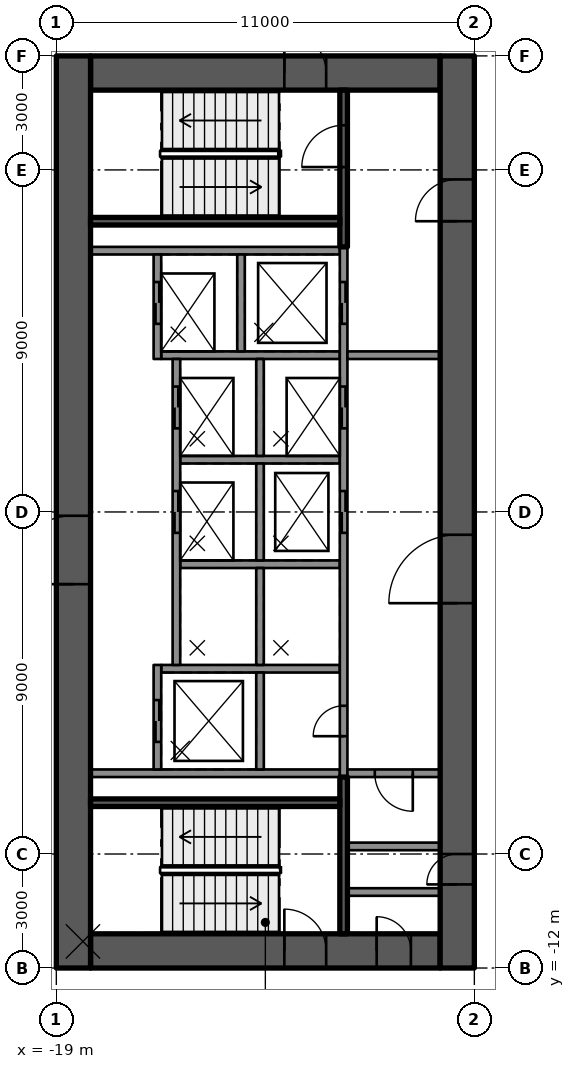
"""IFC4 building model, lengths in metres.
Left out: names, types, materials, properties, quantities, classifications, styles, units other than length and angle.
Written with IfcOpenShell. Run it as: python <this file> out.ifc"""

import sys

from ifc_helpers import new_model, si_unit, direction, frame, frame_2d, origin, place, context, subcontext, project, spatial, rectangle, extrude, element, fill, save


model = new_model("IFC4")
c1 = context("Model", 3, precision=1e-05, world=origin(), true_north=direction((0.0, 1.0)))
c2 = subcontext(c1, "Body", "Model", "MODEL_VIEW")
j1 = project(units=[si_unit("LENGTHUNIT", "METRE"), si_unit("PLANEANGLEUNIT", "RADIAN")], contexts=[c1])
p1 = place(None, origin())
s1 = spatial("IfcSite", under=j1, at=p1, CompositionType="ELEMENT")
p2 = place(p1, origin())
s2 = spatial("IfcBuilding", under=s1, at=p2, CompositionType="ELEMENT")
p3 = place(p2, frame((0.0, 0.0, 33.3)))
s3 = spatial("IfcBuildingStorey", under=s2, at=p3, CompositionType="ELEMENT", Elevation=33.3)
p4 = place(p3, frame((-18.1, 11.55, 0.0), z_axis=(0.0, 0.0, 1.0), x_axis=(1.0, 0.0, 0.0)))
e1 = element("IfcWall", 1, at=p4, inside=s3, PredefinedType="SHEAR", context=c2, shape_type="SweptSolid", body=[
    extrude(rectangle(XDim=9.2, YDim=0.9, at=frame_2d((4.6, 0.0))), origin(), (0.0, 0.0, 1.0), 4.0),
])
p5 = place(p4, frame((5.1, 0.0, 0.0)))
e2 = element("IfcOpeningElement", 2, at=p5, cuts=e1, PredefinedType="OPENING", context=c2, shape_type="SweptSolid", body=[
    extrude(rectangle(XDim=1.1, YDim=2.1, at=frame_2d((0.55, 1.05))), frame((0.0, 0.46, 0.0), z_axis=(0.0, -1.0, 0.0), x_axis=(1.0, 0.0, 0.0)), (0.0, 0.0, 1.0), 0.92),
])
p6 = place(p3, frame((-18.1, -11.55, 0.0), z_axis=(0.0, 0.0, 1.0), x_axis=(1.0, 0.0, 0.0)))
e3 = element("IfcWall", 3, at=p6, inside=s3, PredefinedType="SHEAR", context=c2, shape_type="SweptSolid", body=[
    extrude(rectangle(XDim=9.2, YDim=0.9, at=frame_2d((4.6, 0.0))), origin(), (0.0, 0.0, 1.0), 4.0),
])
p7 = place(p6, frame((5.1, 0.0, 0.0)))
e4 = element("IfcOpeningElement", 4, at=p7, cuts=e3, PredefinedType="OPENING", context=c2, shape_type="SweptSolid", body=[
    extrude(rectangle(XDim=1.1, YDim=2.1, at=frame_2d((0.55, 1.05))), frame((0.0, 0.46, 0.0), z_axis=(0.0, -1.0, 0.0), x_axis=(1.0, 0.0, 0.0)), (0.0, 0.0, 1.0), 0.92),
])
p8 = place(p6, frame((7.53, 0.0, 0.0)))
e5 = element("IfcOpeningElement", 5, at=p8, cuts=e3, PredefinedType="OPENING", context=c2, shape_type="SweptSolid", body=[
    extrude(rectangle(XDim=0.9, YDim=2.1, at=frame_2d((0.45, 1.05))), frame((0.0, 0.46, 0.0), z_axis=(0.0, -1.0, 0.0), x_axis=(1.0, 0.0, 0.0)), (0.0, 0.0, 1.0), 0.92),
])
p9 = place(p3, frame((-18.55, -12.0, 0.0), z_axis=(0.0, 0.0, 1.0), x_axis=(0.0, 1.0, 0.0)))
e6 = element("IfcWall", 6, at=p9, inside=s3, PredefinedType="SHEAR", context=c2, shape_type="SweptSolid", body=[
    extrude(rectangle(XDim=24.0, YDim=0.9, at=frame_2d((12.0, 0.0))), origin(), (0.0, 0.0, 1.0), 4.0),
])
p10 = place(p9, frame((10.1, 0.0, 0.0)))
e7 = element("IfcOpeningElement", 7, at=p10, cuts=e6, PredefinedType="OPENING", context=c2, shape_type="SweptSolid", body=[
    extrude(rectangle(XDim=1.8, YDim=2.1, at=frame_2d((0.9, 1.05))), frame((0.0, 0.46, 0.0), z_axis=(0.0, -1.0, 0.0), x_axis=(1.0, 0.0, 0.0)), (0.0, 0.0, 1.0), 0.92),
])
p11 = place(p3, frame((-8.45, -12.0, 0.0), z_axis=(0.0, 0.0, 1.0), x_axis=(0.0, 1.0, 0.0)))
e8 = element("IfcWall", 8, at=p11, inside=s3, PredefinedType="SHEAR", context=c2, shape_type="SweptSolid", body=[
    extrude(rectangle(XDim=24.0, YDim=0.9, at=frame_2d((12.0, 0.0))), origin(), (0.0, 0.0, 1.0), 4.0),
])
p12 = place(p11, frame((9.6, 0.0, 0.0)))
e9 = element("IfcOpeningElement", 9, at=p12, cuts=e8, PredefinedType="OPENING", context=c2, shape_type="SweptSolid", body=[
    extrude(rectangle(XDim=1.8, YDim=2.1, at=frame_2d((0.9, 1.05))), frame((0.0, 0.46, 0.0), z_axis=(0.0, -1.0, 0.0), x_axis=(1.0, 0.0, 0.0)), (0.0, 0.0, 1.0), 0.92),
])
p13 = place(p11, frame((19.65, 0.0, 0.0)))
e10 = element("IfcOpeningElement", 10, at=p13, cuts=e8, PredefinedType="OPENING", context=c2, shape_type="SweptSolid", body=[
    extrude(rectangle(XDim=1.1, YDim=2.1, at=frame_2d((0.55, 1.05))), frame((0.0, 0.46, 0.0), z_axis=(0.0, -1.0, 0.0), x_axis=(1.0, 0.0, 0.0)), (0.0, 0.0, 1.0), 0.92),
])
p14 = place(p11, frame((2.2, 0.0, 0.0)))
e11 = element("IfcOpeningElement", 11, at=p14, cuts=e8, PredefinedType="OPENING", context=c2, shape_type="SweptSolid", body=[
    extrude(rectangle(XDim=0.8, YDim=2.1, at=frame_2d((0.4, 1.05))), frame((0.0, 0.46, 0.0), z_axis=(0.0, -1.0, 0.0), x_axis=(1.0, 0.0, 0.0)), (0.0, 0.0, 1.0), 0.92),
])
for number, where, z_axis, x_axis in (
    (12, (-11.54, 6.875, 0.0), (0.0, 0.0, 1.0), (-1.0, 0.0, 0.0)),
    (13, (-11.54, -6.875, 0.0), (0.0, 0.0, 1.0), (-1.0, 0.0, 0.0)),
):
    element("IfcWall", number, at=place(p3, frame(where, z_axis=z_axis, x_axis=x_axis)), inside=s3, PredefinedType="SOLIDWALL", context=c2, shape_type="SweptSolid", body=[
        extrude(rectangle(XDim=6.56, YDim=0.2, at=frame_2d((3.28, 0.0))), origin(), (0.0, 0.0, 1.0), 3.58),
    ])
p15 = place(p3, frame((-11.54, -4.125, 0.0), z_axis=(0.0, 0.0, 1.0), x_axis=(-1.0, 0.0, 0.0)))
e14 = element("IfcWall", 14, at=p15, inside=s3, PredefinedType="SOLIDWALL", context=c2, shape_type="SweptSolid", body=[
    extrude(rectangle(XDim=4.7, YDim=0.2, at=frame_2d((2.35, 0.0))), origin(), (0.0, 0.0, 1.0), 3.58),
])
for number, where, z_axis, x_axis in (
    (15, (-11.54, -1.375, 0.0), (0.0, 0.0, 1.0), (-1.0, 0.0, 0.0)),
    (16, (-11.54, 1.375, 0.0), (0.0, 0.0, 1.0), (-1.0, 0.0, 0.0)),
):
    element("IfcWall", number, at=place(p3, frame(where, z_axis=z_axis, x_axis=x_axis)), inside=s3, PredefinedType="SOLIDWALL", context=c2, shape_type="SweptSolid", body=[
        extrude(rectangle(XDim=4.2, YDim=0.2, at=frame_2d((2.1, 0.0))), origin(), (0.0, 0.0, 1.0), 3.58),
    ])
p16 = place(p3, frame((-11.54, 4.125, 0.0), z_axis=(0.0, 0.0, 1.0), x_axis=(-1.0, 0.0, 0.0)))
e17 = element("IfcWall", 17, at=p16, inside=s3, PredefinedType="SOLIDWALL", context=c2, shape_type="SweptSolid", body=[
    extrude(rectangle(XDim=4.7, YDim=0.2, at=frame_2d((2.35, 0.0))), origin(), (0.0, 0.0, 1.0), 3.58),
])
p17 = place(p3, frame((-11.44, -6.975, 0.0), z_axis=(0.0, 0.0, 1.0), x_axis=(0.0, 1.0, 0.0)))
e18 = element("IfcWall", 18, at=p17, inside=s3, PredefinedType="SOLIDWALL", context=c2, shape_type="SweptSolid", body=[
    extrude(rectangle(XDim=13.95, YDim=0.2, at=frame_2d((6.975, 0.0))), origin(), (0.0, 0.0, 1.0), 3.58),
])
p18 = place(p17, frame((6.425, 0.0, 0.0)))
e19 = element("IfcOpeningElement", 19, at=p18, cuts=e18, PredefinedType="OPENING", context=c2, shape_type="SweptSolid", body=[
    extrude(rectangle(XDim=1.1, YDim=2.1, at=frame_2d((0.55, 1.05))), frame((0.0, 0.11, 0.0), z_axis=(0.0, -1.0, 0.0), x_axis=(1.0, 0.0, 0.0)), (0.0, 0.0, 1.0), 0.22),
])
p19 = place(p17, frame((9.175, 0.0, 0.0)))
e20 = element("IfcOpeningElement", 20, at=p19, cuts=e18, PredefinedType="OPENING", context=c2, shape_type="SweptSolid", body=[
    extrude(rectangle(XDim=1.1, YDim=2.1, at=frame_2d((0.55, 1.05))), frame((0.0, 0.11, 0.0), z_axis=(0.0, -1.0, 0.0), x_axis=(1.0, 0.0, 0.0)), (0.0, 0.0, 1.0), 0.22),
])
p20 = place(p17, frame((11.925, 0.0, 0.0)))
e21 = element("IfcOpeningElement", 21, at=p20, cuts=e18, PredefinedType="OPENING", context=c2, shape_type="SweptSolid", body=[
    extrude(rectangle(XDim=1.1, YDim=2.1, at=frame_2d((0.55, 1.05))), frame((0.0, 0.11, 0.0), z_axis=(0.0, -1.0, 0.0), x_axis=(1.0, 0.0, 0.0)), (0.0, 0.0, 1.0), 0.22),
])
p21 = place(p17, frame((1.075, 0.0, 0.0)))
e22 = element("IfcOpeningElement", 22, at=p21, cuts=e18, PredefinedType="OPENING", context=c2, shape_type="SweptSolid", body=[
    extrude(rectangle(XDim=0.8, YDim=2.1, at=frame_2d((0.4, 1.05))), frame((0.0, 0.11, 0.0), z_axis=(0.0, -1.0, 0.0), x_axis=(1.0, 0.0, 0.0)), (0.0, 0.0, 1.0), 0.22),
])
for number, where, z_axis, x_axis in (
    (23, (-13.64, -6.775, 0.0), (0.0, 0.0, 1.0), (0.0, 1.0, 0.0)),
    (24, (-13.64, -4.025, 0.0), (0.0, 0.0, 1.0), (0.0, 1.0, 0.0)),
    (25, (-13.64, -1.275, 0.0), (0.0, 0.0, 1.0), (0.0, 1.0, 0.0)),
    (26, (-13.64, 1.475, 0.0), (0.0, 0.0, 1.0), (0.0, 1.0, 0.0)),
    (27, (-14.14, 4.225, 0.0), (0.0, 0.0, 1.0), (0.0, 1.0, 0.0)),
):
    element("IfcWall", number, at=place(p3, frame(where, z_axis=z_axis, x_axis=x_axis)), inside=s3, PredefinedType="SOLIDWALL", context=c2, shape_type="SweptSolid", body=[
        extrude(rectangle(XDim=2.55, YDim=0.2, at=frame_2d((1.275, 0.0))), origin(), (0.0, 0.0, 1.0), 3.58),
    ])
p22 = place(p3, frame((-16.34, -6.775, 0.0), z_axis=(0.0, 0.0, 1.0), x_axis=(0.0, 1.0, 0.0)))
e28 = element("IfcWall", 28, at=p22, inside=s3, PredefinedType="SOLIDWALL", context=c2, shape_type="SweptSolid", body=[
    extrude(rectangle(XDim=2.75, YDim=0.2, at=frame_2d((1.375, 0.0))), origin(), (0.0, 0.0, 1.0), 3.58),
])
p23 = place(p22, frame((0.725, 0.0, 0.0)))
e29 = element("IfcOpeningElement", 29, at=p23, cuts=e28, PredefinedType="OPENING", context=c2, shape_type="SweptSolid", body=[
    extrude(rectangle(XDim=1.1, YDim=2.1, at=frame_2d((0.55, 1.05))), frame((0.0, 0.11, 0.0), z_axis=(0.0, -1.0, 0.0), x_axis=(1.0, 0.0, 0.0)), (0.0, 0.0, 1.0), 0.22),
])
p24 = place(p3, frame((-15.84, -4.025, 0.0), z_axis=(0.0, 0.0, 1.0), x_axis=(0.0, 1.0, 0.0)))
e30 = element("IfcWall", 30, at=p24, inside=s3, PredefinedType="SOLIDWALL", context=c2, shape_type="SweptSolid", body=[
    extrude(rectangle(XDim=8.05, YDim=0.2, at=frame_2d((4.025, 0.0))), origin(), (0.0, 0.0, 1.0), 3.58),
])
p25 = place(p24, frame((3.475, 0.0, 0.0)))
e31 = element("IfcOpeningElement", 31, at=p25, cuts=e30, PredefinedType="OPENING", context=c2, shape_type="SweptSolid", body=[
    extrude(rectangle(XDim=1.1, YDim=2.1, at=frame_2d((0.55, 1.05))), frame((0.0, 0.11, 0.0), z_axis=(0.0, -1.0, 0.0), x_axis=(1.0, 0.0, 0.0)), (0.0, 0.0, 1.0), 0.22),
])
p26 = place(p24, frame((6.225, 0.0, 0.0)))
e32 = element("IfcOpeningElement", 32, at=p26, cuts=e30, PredefinedType="OPENING", context=c2, shape_type="SweptSolid", body=[
    extrude(rectangle(XDim=1.1, YDim=2.1, at=frame_2d((0.55, 1.05))), frame((0.0, 0.11, 0.0), z_axis=(0.0, -1.0, 0.0), x_axis=(1.0, 0.0, 0.0)), (0.0, 0.0, 1.0), 0.22),
])
p27 = place(p3, frame((-16.34, 4.025, 0.0), z_axis=(0.0, 0.0, 1.0), x_axis=(0.0, 1.0, 0.0)))
e33 = element("IfcWall", 33, at=p27, inside=s3, PredefinedType="SOLIDWALL", context=c2, shape_type="SweptSolid", body=[
    extrude(rectangle(XDim=2.75, YDim=0.2, at=frame_2d((1.375, 0.0))), origin(), (0.0, 0.0, 1.0), 3.58),
])
p28 = place(p27, frame((0.925, 0.0, 0.0)))
e34 = element("IfcOpeningElement", 34, at=p28, cuts=e33, PredefinedType="OPENING", context=c2, shape_type="SweptSolid", body=[
    extrude(rectangle(XDim=1.1, YDim=2.1, at=frame_2d((0.55, 1.05))), frame((0.0, 0.11, 0.0), z_axis=(0.0, -1.0, 0.0), x_axis=(1.0, 0.0, 0.0)), (0.0, 0.0, 1.0), 0.22),
])
p29 = place(p3, frame((-11.44, 6.975, 0.0), z_axis=(0.0, 0.0, 1.0), x_axis=(0.0, 1.0, 0.0)))
e35 = element("IfcWall", 35, at=p29, inside=s3, PredefinedType="SOLIDWALL", context=c2, shape_type="SweptSolid", body=[
    extrude(rectangle(XDim=4.125, YDim=0.2, at=frame_2d((2.062, 0.0))), origin(), (0.0, 0.0, 1.0), 3.58),
])
p30 = place(p29, frame((2.1, 0.0, 0.0)))
e36 = element("IfcOpeningElement", 36, at=p30, cuts=e35, PredefinedType="OPENING", context=c2, shape_type="SweptSolid", body=[
    extrude(rectangle(XDim=1.1, YDim=2.1, at=frame_2d((0.55, 1.05))), frame((0.0, 0.11, 0.0), z_axis=(0.0, -1.0, 0.0), x_axis=(1.0, 0.0, 0.0)), (0.0, 0.0, 1.0), 0.22),
])
p31 = place(p3, frame((-11.54, 7.65, 0.0), z_axis=(0.0, 0.0, 1.0), x_axis=(-1.0, 0.0, 0.0)))
e37 = element("IfcWall", 37, at=p31, inside=s3, PredefinedType="SOLIDWALL", context=c2, shape_type="SweptSolid", body=[
    extrude(rectangle(XDim=6.56, YDim=0.2, at=frame_2d((3.28, 0.0))), origin(), (0.0, 0.0, 1.0), 3.58),
])
p32 = place(p3, frame((-11.44, -11.1, 0.0), z_axis=(0.0, 0.0, 1.0), x_axis=(0.0, 1.0, 0.0)))
e38 = element("IfcWall", 38, at=p32, inside=s3, PredefinedType="SOLIDWALL", context=c2, shape_type="SweptSolid", body=[
    extrude(rectangle(XDim=4.125, YDim=0.2, at=frame_2d((2.062, 0.0))), origin(), (0.0, 0.0, 1.0), 3.58),
])
p33 = place(p3, frame((-11.54, -7.65, 0.0), z_axis=(0.0, 0.0, 1.0), x_axis=(-1.0, 0.0, 0.0)))
e39 = element("IfcWall", 39, at=p33, inside=s3, PredefinedType="SOLIDWALL", context=c2, shape_type="SweptSolid", body=[
    extrude(rectangle(XDim=6.56, YDim=0.2, at=frame_2d((3.28, 0.0))), origin(), (0.0, 0.0, 1.0), 3.58),
])
p34 = place(p3, frame((-8.9, 4.125, 0.0), z_axis=(0.0, 0.0, 1.0), x_axis=(-1.0, 0.0, 0.0)))
e40 = element("IfcWall", 40, at=p34, inside=s3, PredefinedType="PARTITIONING", context=c2, shape_type="SweptSolid", body=[
    extrude(rectangle(XDim=2.44, YDim=0.2, at=frame_2d((1.22, 0.0))), origin(), (0.0, 0.0, 1.0), 3.58),
])
p35 = place(p3, frame((-8.9, -6.875, 0.0), z_axis=(0.0, 0.0, 1.0), x_axis=(-1.0, 0.0, 0.0)))
e41 = element("IfcWall", 41, at=p35, inside=s3, PredefinedType="PARTITIONING", context=c2, shape_type="SweptSolid", body=[
    extrude(rectangle(XDim=2.44, YDim=0.2, at=frame_2d((1.22, 0.0))), origin(), (0.0, 0.0, 1.0), 3.58),
])
p36 = place(p35, frame((0.72, 0.0, 0.0)))
e42 = element("IfcOpeningElement", 42, at=p36, cuts=e41, PredefinedType="OPENING", context=c2, shape_type="SweptSolid", body=[
    extrude(rectangle(XDim=1.0, YDim=2.1, at=frame_2d((0.5, 1.05))), frame((0.0, 0.11, 0.0), z_axis=(0.0, -1.0, 0.0), x_axis=(1.0, 0.0, 0.0)), (0.0, 0.0, 1.0), 0.22),
])
for number, where, z_axis, x_axis in (
    (43, (-8.9, -10.0, 0.0), (0.0, 0.0, 1.0), (-1.0, 0.0, 0.0)),
    (44, (-8.9, -8.8, 0.0), (0.0, 0.0, 1.0), (-1.0, 0.0, 0.0)),
):
    element("IfcWall", number, at=place(p3, frame(where, z_axis=z_axis, x_axis=x_axis)), inside=s3, PredefinedType="PARTITIONING", context=c2, shape_type="SweptSolid", body=[
        extrude(rectangle(XDim=2.44, YDim=0.2, at=frame_2d((1.22, 0.0))), origin(), (0.0, 0.0, 1.0), 3.58),
    ])
p37 = place(p23, origin())
e45 = element("IfcDoor", 45, at=p37, inside=s3, OperationType="DOUBLE_DOOR_SLIDING", PredefinedType="DOOR", context=c2, shape_type="SweptSolid", body=[
    extrude(rectangle(XDim=1.1, YDim=2.1, at=frame_2d((0.55, 1.05))), frame((0.0, 0.025, 0.0), z_axis=(0.0, -1.0, 0.0), x_axis=(1.0, 0.0, 0.0)), (0.0, 0.0, 1.0), 0.05),
])
fill(e29, e45)
p38 = place(p18, origin())
e46 = element("IfcDoor", 46, at=p38, inside=s3, OperationType="DOUBLE_DOOR_SLIDING", PredefinedType="DOOR", context=c2, shape_type="SweptSolid", body=[
    extrude(rectangle(XDim=1.1, YDim=2.1, at=frame_2d((0.55, 1.05))), frame((0.0, 0.025, 0.0), z_axis=(0.0, -1.0, 0.0), x_axis=(1.0, 0.0, 0.0)), (0.0, 0.0, 1.0), 0.05),
])
fill(e19, e46)
p39 = place(p25, origin())
e47 = element("IfcDoor", 47, at=p39, inside=s3, OperationType="DOUBLE_DOOR_SLIDING", PredefinedType="DOOR", context=c2, shape_type="SweptSolid", body=[
    extrude(rectangle(XDim=1.1, YDim=2.1, at=frame_2d((0.55, 1.05))), frame((0.0, 0.025, 0.0), z_axis=(0.0, -1.0, 0.0), x_axis=(1.0, 0.0, 0.0)), (0.0, 0.0, 1.0), 0.05),
])
fill(e31, e47)
p40 = place(p19, origin())
e48 = element("IfcDoor", 48, at=p40, inside=s3, OperationType="DOUBLE_DOOR_SLIDING", PredefinedType="DOOR", context=c2, shape_type="SweptSolid", body=[
    extrude(rectangle(XDim=1.1, YDim=2.1, at=frame_2d((0.55, 1.05))), frame((0.0, 0.025, 0.0), z_axis=(0.0, -1.0, 0.0), x_axis=(1.0, 0.0, 0.0)), (0.0, 0.0, 1.0), 0.05),
])
fill(e20, e48)
p41 = place(p26, origin())
e49 = element("IfcDoor", 49, at=p41, inside=s3, OperationType="DOUBLE_DOOR_SLIDING", PredefinedType="DOOR", context=c2, shape_type="SweptSolid", body=[
    extrude(rectangle(XDim=1.1, YDim=2.1, at=frame_2d((0.55, 1.05))), frame((0.0, 0.025, 0.0), z_axis=(0.0, -1.0, 0.0), x_axis=(1.0, 0.0, 0.0)), (0.0, 0.0, 1.0), 0.05),
])
fill(e32, e49)
p42 = place(p20, origin())
e50 = element("IfcDoor", 50, at=p42, inside=s3, OperationType="DOUBLE_DOOR_SLIDING", PredefinedType="DOOR", context=c2, shape_type="SweptSolid", body=[
    extrude(rectangle(XDim=1.1, YDim=2.1, at=frame_2d((0.55, 1.05))), frame((0.0, 0.025, 0.0), z_axis=(0.0, -1.0, 0.0), x_axis=(1.0, 0.0, 0.0)), (0.0, 0.0, 1.0), 0.05),
])
fill(e21, e50)
p43 = place(p28, origin())
e51 = element("IfcDoor", 51, at=p43, inside=s3, OperationType="DOUBLE_DOOR_SLIDING", PredefinedType="DOOR", context=c2, shape_type="SweptSolid", body=[
    extrude(rectangle(XDim=1.1, YDim=2.1, at=frame_2d((0.55, 1.05))), frame((0.0, 0.025, 0.0), z_axis=(0.0, -1.0, 0.0), x_axis=(1.0, 0.0, 0.0)), (0.0, 0.0, 1.0), 0.05),
])
fill(e34, e51)
p44 = place(p21, origin())
e52 = element("IfcDoor", 52, at=p44, inside=s3, OperationType="SINGLE_SWING_LEFT", PredefinedType="DOOR", context=c2, shape_type="SweptSolid", body=[
    extrude(rectangle(XDim=0.8, YDim=2.1, at=frame_2d((0.4, 1.05))), frame((0.0, 0.025, 0.0), z_axis=(0.0, -1.0, 0.0), x_axis=(1.0, 0.0, 0.0)), (0.0, 0.0, 1.0), 0.05),
])
fill(e22, e52)
p45 = place(p12, origin())
e53 = element("IfcDoor", 53, at=p45, inside=s3, OperationType="SINGLE_SWING_LEFT", PredefinedType="DOOR", context=c2, shape_type="SweptSolid", body=[
    extrude(rectangle(XDim=1.8, YDim=2.1, at=frame_2d((0.9, 1.05))), frame((0.0, 0.025, 0.0), z_axis=(0.0, -1.0, 0.0), x_axis=(1.0, 0.0, 0.0)), (0.0, 0.0, 1.0), 0.05),
])
fill(e9, e53)
p46 = place(p10, origin())
e54 = element("IfcDoor", 54, at=p46, inside=s3, OperationType="SINGLE_SWING_LEFT", PredefinedType="DOOR", context=c2, shape_type="SweptSolid", body=[
    extrude(rectangle(XDim=1.8, YDim=2.1, at=frame_2d((0.9, 1.05))), frame((0.0, 0.025, 0.0), z_axis=(0.0, -1.0, 0.0), x_axis=(1.0, 0.0, 0.0)), (0.0, 0.0, 1.0), 0.05),
])
fill(e7, e54)
p47 = place(p13, origin())
e55 = element("IfcDoor", 55, at=p47, inside=s3, OperationType="SINGLE_SWING_RIGHT", PredefinedType="DOOR", context=c2, shape_type="SweptSolid", body=[
    extrude(rectangle(XDim=1.1, YDim=2.1, at=frame_2d((0.55, 1.05))), frame((0.0, 0.025, 0.0), z_axis=(0.0, -1.0, 0.0), x_axis=(1.0, 0.0, 0.0)), (0.0, 0.0, 1.0), 0.05),
])
fill(e10, e55)
p48 = place(p5, origin())
e56 = element("IfcDoor", 56, at=p48, inside=s3, OperationType="SINGLE_SWING_RIGHT", PredefinedType="DOOR", context=c2, shape_type="SweptSolid", body=[
    extrude(rectangle(XDim=1.1, YDim=2.1, at=frame_2d((0.55, 1.05))), frame((0.0, 0.025, 0.0), z_axis=(0.0, -1.0, 0.0), x_axis=(1.0, 0.0, 0.0)), (0.0, 0.0, 1.0), 0.05),
])
fill(e2, e56)
p49 = place(p7, origin())
e57 = element("IfcDoor", 57, at=p49, inside=s3, OperationType="SINGLE_SWING_RIGHT", PredefinedType="DOOR", context=c2, shape_type="SweptSolid", body=[
    extrude(rectangle(XDim=1.1, YDim=2.1, at=frame_2d((0.55, 1.05))), frame((0.0, 0.025, 0.0), z_axis=(0.0, -1.0, 0.0), x_axis=(1.0, 0.0, 0.0)), (0.0, 0.0, 1.0), 0.05),
])
fill(e4, e57)
p50 = place(p30, origin())
e58 = element("IfcDoor", 58, at=p50, inside=s3, OperationType="SINGLE_SWING_RIGHT", PredefinedType="DOOR", context=c2, shape_type="SweptSolid", body=[
    extrude(rectangle(XDim=1.1, YDim=2.1, at=frame_2d((0.55, 1.05))), frame((0.0, 0.025, 0.0), z_axis=(0.0, -1.0, 0.0), x_axis=(1.0, 0.0, 0.0)), (0.0, 0.0, 1.0), 0.05),
])
fill(e36, e58)
p51 = place(p8, origin())
e59 = element("IfcDoor", 59, at=p51, inside=s3, OperationType="SINGLE_SWING_RIGHT", PredefinedType="DOOR", context=c2, shape_type="SweptSolid", body=[
    extrude(rectangle(XDim=0.9, YDim=2.1, at=frame_2d((0.45, 1.05))), frame((0.0, 0.025, 0.0), z_axis=(0.0, -1.0, 0.0), x_axis=(1.0, 0.0, 0.0)), (0.0, 0.0, 1.0), 0.05),
])
fill(e5, e59)
p52 = place(p14, origin())
e60 = element("IfcDoor", 60, at=p52, inside=s3, OperationType="SINGLE_SWING_LEFT", PredefinedType="DOOR", context=c2, shape_type="SweptSolid", body=[
    extrude(rectangle(XDim=0.8, YDim=2.1, at=frame_2d((0.4, 1.05))), frame((0.0, 0.025, 0.0), z_axis=(0.0, -1.0, 0.0), x_axis=(1.0, 0.0, 0.0)), (0.0, 0.0, 1.0), 0.05),
])
fill(e11, e60)
p53 = place(p36, origin())
e61 = element("IfcDoor", 61, at=p53, inside=s3, OperationType="SINGLE_SWING_RIGHT", PredefinedType="DOOR", context=c2, shape_type="SweptSolid", body=[
    extrude(rectangle(XDim=1.0, YDim=2.1, at=frame_2d((0.5, 1.05))), frame((0.0, 0.025, 0.0), z_axis=(0.0, -1.0, 0.0), x_axis=(1.0, 0.0, 0.0)), (0.0, 0.0, 1.0), 0.05),
])
fill(e42, e61)
save(model, sys.argv[1])
